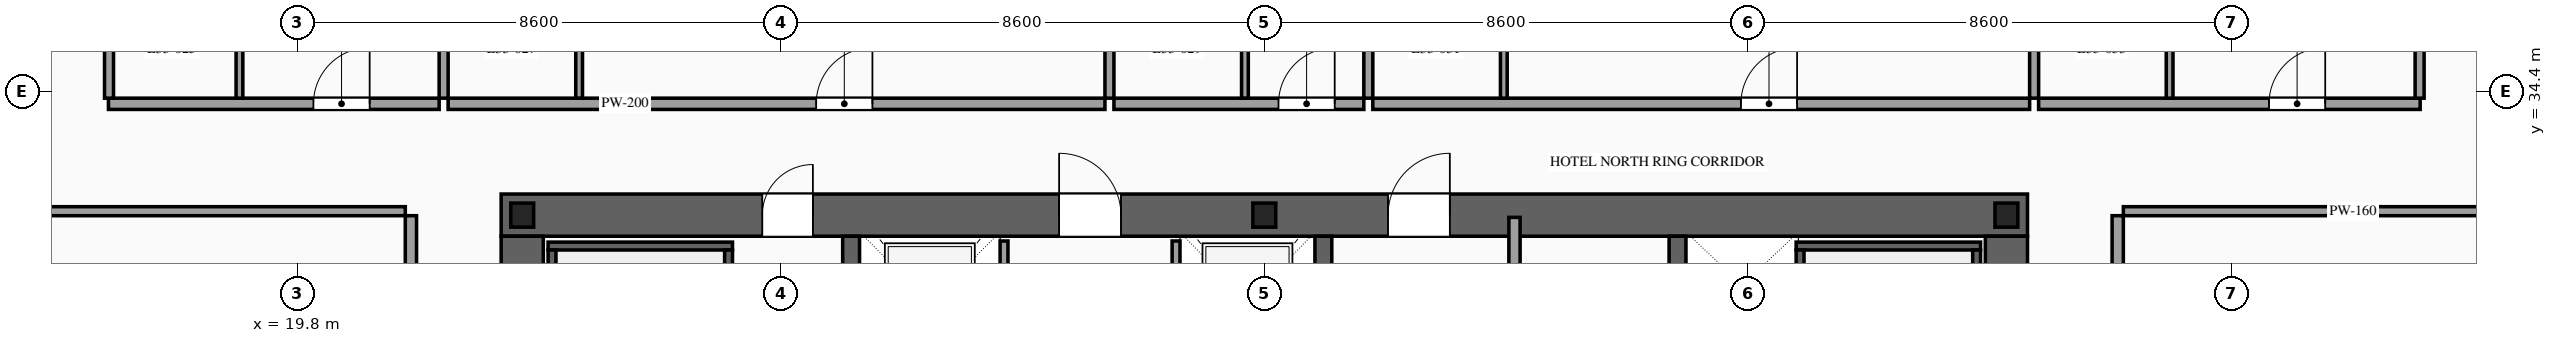
"""IFC4 building model, lengths in metres.
Left out: names, types, materials, properties, quantities, classifications, styles, units other than length and angle.
Written with IfcOpenShell. Run it as: python <this file> out.ifc"""

import sys

from ifc_helpers import new_model, si_unit, direction, frame, frame_2d, origin, origin_2d, place, context, subcontext, project, spatial, rectangle, i_section, extrude, source, transform, mapped, element, fill, save


model = new_model("IFC4")
c1 = context("Model", 3, precision=1e-05, world=origin(), true_north=direction((0.0, 1.0)))
c2 = subcontext(c1, "Body", "Model", "MODEL_VIEW")
j1 = project(units=[si_unit("LENGTHUNIT", "METRE"), si_unit("PLANEANGLEUNIT", "RADIAN")], contexts=[c1])
p1 = place(None, origin())
s1 = spatial("IfcSite", under=j1, at=p1, CompositionType="ELEMENT")
p2 = place(p1, origin())
s2 = spatial("IfcBuilding", under=s1, at=p2, CompositionType="ELEMENT")
p3 = place(p2, frame((0.0, 0.0, 126.2)))
s3 = spatial("IfcBuildingStorey", under=s2, at=p3, CompositionType="ELEMENT", Elevation=126.2)
p4 = place(p3, frame((23.425, 32.2, 0.0), z_axis=(0.0, 0.0, 1.0), x_axis=(1.0, 0.0, 0.0)))
e1 = element("IfcWall", 1, at=p4, inside=s3, PredefinedType="SHEAR", context=c2, shape_type="SweptSolid", body=[
    extrude(rectangle(XDim=27.15, YDim=0.75, at=frame_2d((13.575, 0.0))), origin(), (0.0, 0.0, 1.0), 3.6),
])
p5 = place(p4, frame((4.645, 0.0, 0.0)))
e2 = element("IfcOpeningElement", 2, at=p5, cuts=e1, PredefinedType="OPENING", context=c2, shape_type="SweptSolid", body=[
    extrude(rectangle(XDim=0.9, YDim=2.15, at=frame_2d((0.45, 1.075))), frame((0.0, 0.39, 0.0), z_axis=(0.0, -1.0, 0.0), x_axis=(1.0, 0.0, 0.0)), (0.0, 0.0, 1.0), 0.78),
])
p6 = place(p4, frame((9.925, 0.0, 0.0)))
e3 = element("IfcOpeningElement", 3, at=p6, cuts=e1, PredefinedType="OPENING", context=c2, shape_type="SweptSolid", body=[
    extrude(rectangle(XDim=1.1, YDim=2.2, at=frame_2d((0.55, 1.1))), frame((0.0, 0.39, 0.0), z_axis=(0.0, -1.0, 0.0), x_axis=(1.0, 0.0, 0.0)), (0.0, 0.0, 1.0), 0.78),
])
p7 = place(p4, frame((15.775, 0.0, 0.0)))
e4 = element("IfcOpeningElement", 4, at=p7, cuts=e1, PredefinedType="OPENING", context=c2, shape_type="SweptSolid", body=[
    extrude(rectangle(XDim=1.1, YDim=2.2, at=frame_2d((0.55, 1.1))), frame((0.0, 0.39, 0.0), z_axis=(0.0, -1.0, 0.0), x_axis=(1.0, 0.0, 0.0)), (0.0, 0.0, 1.0), 0.78),
])
m1 = source(origin(), c2, "Body", "SweptSolid", [
    extrude(rectangle(XDim=12.05, YDim=0.75, at=frame_2d((6.025, 0.0))), origin(), (0.0, 0.0, 1.0), 3.6),
])
for number, where, z_axis, x_axis in (
    (5, (23.8, 19.775, 0.0), (0.0, 0.0, 1.0), (0.0, 1.0, 0.0)),
    (6, (50.2, 19.775, 0.0), (0.0, 0.0, 1.0), (0.0, 1.0, 0.0)),
):
    element("IfcWall", number, at=place(p3, frame(where, z_axis=z_axis, x_axis=x_axis)), inside=s3, PredefinedType="SHEAR", context=c2, shape_type="MappedRepresentation", body=[
        mapped(m1, transform((0.0, 0.0, 0.0), scale=1.0)),
    ])
m2 = source(origin(), c2, "Body", "SweptSolid", [
    extrude(rectangle(XDim=12.05, YDim=0.3, at=frame_2d((6.025, 0.0))), origin(), (0.0, 0.0, 1.0), 3.6),
])
for number, where, z_axis, x_axis in (
    (7, (29.65, 19.775, 0.0), (0.0, 0.0, 1.0), (0.0, 1.0, 0.0)),
    (8, (38.05, 19.775, 0.0), (0.0, 0.0, 1.0), (0.0, 1.0, 0.0)),
    (9, (44.35, 19.775, 0.0), (0.0, 0.0, 1.0), (0.0, 1.0, 0.0)),
):
    element("IfcWall", number, at=place(p3, frame(where, z_axis=z_axis, x_axis=x_axis)), inside=s3, PredefinedType="SOLIDWALL", context=c2, shape_type="MappedRepresentation", body=[
        mapped(m2, transform((0.0, 0.0, 0.0), scale=1.0)),
    ])
m3 = source(origin(), c2, "Body", "SweptSolid", [
    extrude(i_section(OverallWidth=0.407, OverallDepth=0.428, WebThickness=0.02, FlangeThickness=0.035, at=origin_2d()), origin(), (0.0, 0.0, 1.0), 3.6),
])
for number, where, z_axis, x_axis in (
    (10, (23.8, 32.2, 0.0), (0.0, 0.0, 1.0), (1.0, 0.0, 0.0)),
    (11, (37.0, 32.2, 0.0), (0.0, 0.0, 1.0), (1.0, 0.0, 0.0)),
    (12, (50.2, 32.2, 0.0), (0.0, 0.0, 1.0), (1.0, 0.0, 0.0)),
):
    element("IfcColumn", number, at=place(p3, frame(where, z_axis=z_axis, x_axis=x_axis)), inside=s3, PredefinedType="COLUMN", context=c2, shape_type="MappedRepresentation", body=[
        mapped(m3, transform((0.0, 0.0, 0.0), scale=1.0)),
    ])
p8 = place(p3, frame((32.37, 29.4, 0.0), z_axis=(0.0, 0.0, 1.0), x_axis=(0.0, 1.0, 0.0)))
e13 = element("IfcWall", 13, at=p8, inside=s3, PredefinedType="SOLIDWALL", context=c2, shape_type="SweptSolid", body=[
    extrude(rectangle(XDim=2.34, YDim=0.14, at=frame_2d((1.17, 0.0))), origin(), (0.0, 0.0, 1.0), 3.32),
])
p9 = place(p8, frame((0.62, 0.0, 0.0)))
e14 = element("IfcOpeningElement", 14, at=p9, cuts=e13, PredefinedType="OPENING", context=c2, shape_type="SweptSolid", body=[
    extrude(rectangle(XDim=1.1, YDim=2.2, at=frame_2d((0.55, 1.1))), frame((0.0, 0.085, 0.0), z_axis=(0.0, -1.0, 0.0), x_axis=(1.0, 0.0, 0.0)), (0.0, 0.0, 1.0), 0.17),
])
p10 = place(p3, frame((35.43, 29.4, 0.0), z_axis=(0.0, 0.0, 1.0), x_axis=(0.0, 1.0, 0.0)))
e15 = element("IfcWall", 15, at=p10, inside=s3, PredefinedType="SOLIDWALL", context=c2, shape_type="SweptSolid", body=[
    extrude(rectangle(XDim=2.34, YDim=0.14, at=frame_2d((1.17, 0.0))), origin(), (0.0, 0.0, 1.0), 3.32),
])
p11 = place(p10, frame((0.62, 0.0, 0.0)))
e16 = element("IfcOpeningElement", 16, at=p11, cuts=e15, PredefinedType="OPENING", context=c2, shape_type="SweptSolid", body=[
    extrude(rectangle(XDim=1.1, YDim=2.2, at=frame_2d((0.55, 1.1))), frame((0.0, 0.085, 0.0), z_axis=(0.0, -1.0, 0.0), x_axis=(1.0, 0.0, 0.0)), (0.0, 0.0, 1.0), 0.17),
])
m4 = source(origin(), c2, "Body", "SweptSolid", [
    extrude(rectangle(XDim=3.28, YDim=0.14, at=frame_2d((1.64, 0.0))), origin(), (0.0, 0.0, 1.0), 3.32),
])
p12 = place(p3, frame((24.26, 31.65, 0.0), z_axis=(0.0, 0.0, 1.0), x_axis=(1.0, 0.0, 0.0)))
e17 = element("IfcWall", 17, at=p12, inside=s3, PredefinedType="SOLIDWALL", context=c2, shape_type="MappedRepresentation", body=[
    mapped(m4, transform((0.0, 0.0, 0.0), scale=1.0)),
])
m5 = source(origin(), c2, "Body", "SweptSolid", [
    extrude(rectangle(XDim=8.94, YDim=0.14, at=frame_2d((4.47, 0.0))), origin(), (0.0, 0.0, 1.0), 3.32),
])
for number, where, z_axis, x_axis in (
    (18, (24.33, 22.64, 0.0), (0.0, 0.0, 1.0), (0.0, 1.0, 0.0)),
    (19, (27.47, 22.64, 0.0), (0.0, 0.0, 1.0), (0.0, 1.0, 0.0)),
):
    element("IfcWall", number, at=place(p3, frame(where, z_axis=z_axis, x_axis=x_axis)), inside=s3, PredefinedType="SOLIDWALL", context=c2, shape_type="MappedRepresentation", body=[
        mapped(m5, transform((0.0, 0.0, 0.0), scale=1.0)),
    ])
p13 = place(p3, frame((46.46, 31.65, 0.0), z_axis=(0.0, 0.0, 1.0), x_axis=(1.0, 0.0, 0.0)))
e20 = element("IfcWall", 20, at=p13, inside=s3, PredefinedType="SOLIDWALL", context=c2, shape_type="MappedRepresentation", body=[
    mapped(m4, transform((0.0, 0.0, 0.0), scale=1.0)),
])
for number, where, z_axis, x_axis in (
    (21, (46.53, 22.64, 0.0), (0.0, 0.0, 1.0), (0.0, 1.0, 0.0)),
    (22, (49.67, 22.64, 0.0), (0.0, 0.0, 1.0), (0.0, 1.0, 0.0)),
):
    element("IfcWall", number, at=place(p3, frame(where, z_axis=z_axis, x_axis=x_axis)), inside=s3, PredefinedType="SOLIDWALL", context=c2, shape_type="MappedRepresentation", body=[
        mapped(m5, transform((0.0, 0.0, 0.0), scale=1.0)),
    ])
m6 = source(origin(), c2, "Body", "SweptSolid", [
    extrude(rectangle(XDim=12.72, YDim=0.2, at=frame_2d((6.36, 0.0))), origin(), (0.0, 0.0, 1.0), 3.32),
])
p14 = place(p3, frame((41.45, 19.44, 0.0), z_axis=(0.0, 0.0, 1.0), x_axis=(0.0, 1.0, 0.0)))
e23 = element("IfcWall", 23, at=p14, inside=s3, PredefinedType="PARTITIONING", context=c2, shape_type="MappedRepresentation", body=[
    mapped(m6, transform((0.0, 0.0, 0.0), scale=1.0)),
])
p15 = place(p3, frame((16.44, 34.18, 0.0), z_axis=(0.0, 0.0, 1.0), x_axis=(1.0, 0.0, 0.0)))
e24 = element("IfcWall", 24, at=p15, inside=s3, PredefinedType="PARTITIONING", context=c2, shape_type="SweptSolid", body=[
    extrude(rectangle(XDim=5.882, YDim=0.2, at=frame_2d((2.941, 0.0))), origin(), (0.0, 0.0, 1.0), 3.32),
])
p16 = place(p15, frame((3.646, 0.0, 0.0)))
e25 = element("IfcOpeningElement", 25, at=p16, cuts=e24, PredefinedType="OPENING", context=c2, shape_type="SweptSolid", body=[
    extrude(rectangle(XDim=1.0, YDim=2.2, at=frame_2d((0.5, 1.1))), frame((0.0, 0.115, 0.0), z_axis=(0.0, -1.0, 0.0), x_axis=(1.0, 0.0, 0.0)), (0.0, 0.0, 1.0), 0.23),
])
m7 = source(origin(), c2, "Body", "SweptSolid", [
    extrude(rectangle(XDim=14.97, YDim=0.16, at=frame_2d((7.485, 0.0))), origin(), (0.0, 0.0, 1.0), 3.32),
])
p17 = place(p3, frame((22.402, 34.28, 0.0), z_axis=(0.0, 0.0, 1.0), x_axis=(0.0, 1.0, 0.0)))
e26 = element("IfcWall", 26, at=p17, inside=s3, PredefinedType="PARTITIONING", context=c2, shape_type="MappedRepresentation", body=[
    mapped(m7, transform((0.0, 0.0, 0.0), scale=1.0)),
])
m8 = source(origin(), c2, "Body", "SweptSolid", [
    extrude(rectangle(XDim=2.42, YDim=0.12, at=frame_2d((1.21, 0.0))), origin(), (0.0, 0.0, 1.0), 3.32),
])
p18 = place(p3, frame((18.77, 34.28, 0.0), z_axis=(0.0, 0.0, 1.0), x_axis=(0.0, 1.0, 0.0)))
e27 = element("IfcWall", 27, at=p18, inside=s3, PredefinedType="PARTITIONING", context=c2, shape_type="MappedRepresentation", body=[
    mapped(m8, transform((0.0, 0.0, 0.0), scale=1.0)),
])
p19 = place(p3, frame((22.482, 34.18, 0.0), z_axis=(0.0, 0.0, 1.0), x_axis=(1.0, 0.0, 0.0)))
e28 = element("IfcWall", 28, at=p19, inside=s3, PredefinedType="PARTITIONING", context=c2, shape_type="SweptSolid", body=[
    extrude(rectangle(XDim=11.683, YDim=0.2, at=frame_2d((5.842, 0.0))), origin(), (0.0, 0.0, 1.0), 3.32),
])
p20 = place(p19, frame((6.547, 0.0, 0.0)))
e29 = element("IfcOpeningElement", 29, at=p20, cuts=e28, PredefinedType="OPENING", context=c2, shape_type="SweptSolid", body=[
    extrude(rectangle(XDim=1.0, YDim=2.2, at=frame_2d((0.5, 1.1))), frame((0.0, 0.115, 0.0), z_axis=(0.0, -1.0, 0.0), x_axis=(1.0, 0.0, 0.0)), (0.0, 0.0, 1.0), 0.23),
])
p21 = place(p3, frame((34.245, 34.28, 0.0), z_axis=(0.0, 0.0, 1.0), x_axis=(0.0, 1.0, 0.0)))
e30 = element("IfcWall", 30, at=p21, inside=s3, PredefinedType="PARTITIONING", context=c2, shape_type="MappedRepresentation", body=[
    mapped(m7, transform((0.0, 0.0, 0.0), scale=1.0)),
])
p22 = place(p3, frame((24.812, 34.28, 0.0), z_axis=(0.0, 0.0, 1.0), x_axis=(0.0, 1.0, 0.0)))
e31 = element("IfcWall", 31, at=p22, inside=s3, PredefinedType="PARTITIONING", context=c2, shape_type="MappedRepresentation", body=[
    mapped(m8, transform((0.0, 0.0, 0.0), scale=1.0)),
])
p23 = place(p3, frame((34.325, 34.18, 0.0), z_axis=(0.0, 0.0, 1.0), x_axis=(1.0, 0.0, 0.0)))
e32 = element("IfcWall", 32, at=p23, inside=s3, PredefinedType="PARTITIONING", context=c2, shape_type="SweptSolid", body=[
    extrude(rectangle(XDim=4.445, YDim=0.2, at=frame_2d((2.223, 0.0))), origin(), (0.0, 0.0, 1.0), 3.32),
])
p24 = place(p23, frame((2.927, 0.0, 0.0)))
e33 = element("IfcOpeningElement", 33, at=p24, cuts=e32, PredefinedType="OPENING", context=c2, shape_type="SweptSolid", body=[
    extrude(rectangle(XDim=1.0, YDim=2.2, at=frame_2d((0.5, 1.1))), frame((0.0, 0.115, 0.0), z_axis=(0.0, -1.0, 0.0), x_axis=(1.0, 0.0, 0.0)), (0.0, 0.0, 1.0), 0.23),
])
p25 = place(p3, frame((38.85, 34.28, 0.0), z_axis=(0.0, 0.0, 1.0), x_axis=(0.0, 1.0, 0.0)))
e34 = element("IfcWall", 34, at=p25, inside=s3, PredefinedType="PARTITIONING", context=c2, shape_type="MappedRepresentation", body=[
    mapped(m7, transform((0.0, 0.0, 0.0), scale=1.0)),
])
p26 = place(p3, frame((36.655, 34.28, 0.0), z_axis=(0.0, 0.0, 1.0), x_axis=(0.0, 1.0, 0.0)))
e35 = element("IfcWall", 35, at=p26, inside=s3, PredefinedType="PARTITIONING", context=c2, shape_type="MappedRepresentation", body=[
    mapped(m8, transform((0.0, 0.0, 0.0), scale=1.0)),
])
p27 = place(p3, frame((38.93, 34.18, 0.0), z_axis=(0.0, 0.0, 1.0), x_axis=(1.0, 0.0, 0.0)))
e36 = element("IfcWall", 36, at=p27, inside=s3, PredefinedType="PARTITIONING", context=c2, shape_type="SweptSolid", body=[
    extrude(rectangle(XDim=11.683, YDim=0.2, at=frame_2d((5.842, 0.0))), origin(), (0.0, 0.0, 1.0), 3.32),
])
p28 = place(p27, frame((6.547, 0.0, 0.0)))
e37 = element("IfcOpeningElement", 37, at=p28, cuts=e36, PredefinedType="OPENING", context=c2, shape_type="SweptSolid", body=[
    extrude(rectangle(XDim=1.0, YDim=2.2, at=frame_2d((0.5, 1.1))), frame((0.0, 0.115, 0.0), z_axis=(0.0, -1.0, 0.0), x_axis=(1.0, 0.0, 0.0)), (0.0, 0.0, 1.0), 0.23),
])
p29 = place(p3, frame((50.693, 34.28, 0.0), z_axis=(0.0, 0.0, 1.0), x_axis=(0.0, 1.0, 0.0)))
e38 = element("IfcWall", 38, at=p29, inside=s3, PredefinedType="PARTITIONING", context=c2, shape_type="MappedRepresentation", body=[
    mapped(m7, transform((0.0, 0.0, 0.0), scale=1.0)),
])
p30 = place(p3, frame((41.26, 34.28, 0.0), z_axis=(0.0, 0.0, 1.0), x_axis=(0.0, 1.0, 0.0)))
e39 = element("IfcWall", 39, at=p30, inside=s3, PredefinedType="PARTITIONING", context=c2, shape_type="MappedRepresentation", body=[
    mapped(m8, transform((0.0, 0.0, 0.0), scale=1.0)),
])
p31 = place(p3, frame((50.773, 34.18, 0.0), z_axis=(0.0, 0.0, 1.0), x_axis=(1.0, 0.0, 0.0)))
e40 = element("IfcWall", 40, at=p31, inside=s3, PredefinedType="PARTITIONING", context=c2, shape_type="SweptSolid", body=[
    extrude(rectangle(XDim=6.787, YDim=0.2, at=frame_2d((3.394, 0.0))), origin(), (0.0, 0.0, 1.0), 3.32),
])
p32 = place(p31, frame((4.098, 0.0, 0.0)))
e41 = element("IfcOpeningElement", 41, at=p32, cuts=e40, PredefinedType="OPENING", context=c2, shape_type="SweptSolid", body=[
    extrude(rectangle(XDim=1.0, YDim=2.2, at=frame_2d((0.5, 1.1))), frame((0.0, 0.115, 0.0), z_axis=(0.0, -1.0, 0.0), x_axis=(1.0, 0.0, 0.0)), (0.0, 0.0, 1.0), 0.23),
])
m9 = source(origin(), c2, "Body", "SweptSolid", [
    extrude(rectangle(XDim=14.82, YDim=0.16, at=frame_2d((7.41, 0.0))), origin(), (0.0, 0.0, 1.0), 3.32),
])
for number, where, z_axis, x_axis in (
    (42, (16.45, 34.28, 0.0), (0.0, 0.0, 1.0), (0.0, 1.0, 0.0)),
    (43, (57.55, 34.28, 0.0), (0.0, 0.0, 1.0), (0.0, 1.0, 0.0)),
):
    element("IfcWall", number, at=place(p3, frame(where, z_axis=z_axis, x_axis=x_axis)), inside=s3, PredefinedType="PARTITIONING", context=c2, shape_type="MappedRepresentation", body=[
        mapped(m9, transform((0.0, 0.0, 0.0), scale=1.0)),
    ])
p33 = place(p3, frame((53.103, 34.28, 0.0), z_axis=(0.0, 0.0, 1.0), x_axis=(0.0, 1.0, 0.0)))
e44 = element("IfcWall", 44, at=p33, inside=s3, PredefinedType="PARTITIONING", context=c2, shape_type="MappedRepresentation", body=[
    mapped(m8, transform((0.0, 0.0, 0.0), scale=1.0)),
])
p34 = place(p3, frame((21.82, 19.41, 0.0), z_axis=(0.0, 0.0, 1.0), x_axis=(0.0, 1.0, 0.0)))
e45 = element("IfcWall", 45, at=p34, inside=s3, PredefinedType="PARTITIONING", context=c2, shape_type="SweptSolid", body=[
    extrude(rectangle(XDim=12.78, YDim=0.2, at=frame_2d((6.39, 0.0))), origin(), (0.0, 0.0, 1.0), 3.32),
])
p35 = place(p34, frame((5.89, 0.0, 0.0)))
e46 = element("IfcOpeningElement", 46, at=p35, cuts=e45, PredefinedType="OPENING", context=c2, shape_type="SweptSolid", body=[
    extrude(rectangle(XDim=1.0, YDim=2.2, at=frame_2d((0.5, 1.1))), frame((0.0, 0.115, 0.0), z_axis=(0.0, -1.0, 0.0), x_axis=(1.0, 0.0, 0.0)), (0.0, 0.0, 1.0), 0.23),
])
m10 = source(origin(), c2, "Body", "SweptSolid", [
    extrude(rectangle(XDim=8.17, YDim=0.16, at=frame_2d((4.085, 0.0))), origin(), (0.0, 0.0, 1.0), 2.815),
])
p36 = place(p3, frame((13.55, 32.27, 0.0), z_axis=(0.0, 0.0, 1.0), x_axis=(1.0, 0.0, 0.0)))
e47 = element("IfcWall", 47, at=p36, inside=s3, PredefinedType="PARTITIONING", context=c2, shape_type="MappedRepresentation", body=[
    mapped(m10, transform((0.0, 0.0, 0.0), scale=1.0)),
])
p37 = place(p3, frame((52.18, 25.88, 0.0), z_axis=(0.0, 0.0, 1.0), x_axis=(0.0, 1.0, 0.0)))
e48 = element("IfcWall", 48, at=p37, inside=s3, PredefinedType="PARTITIONING", context=c2, shape_type="SweptSolid", body=[
    extrude(rectangle(XDim=6.31, YDim=0.2, at=frame_2d((3.155, 0.0))), origin(), (0.0, 0.0, 1.0), 3.32),
])
p38 = place(p37, frame((3.835, 0.0, 0.0)))
e49 = element("IfcOpeningElement", 49, at=p38, cuts=e48, PredefinedType="OPENING", context=c2, shape_type="SweptSolid", body=[
    extrude(rectangle(XDim=1.0, YDim=2.2, at=frame_2d((0.5, 1.1))), frame((0.0, 0.115, 0.0), z_axis=(0.0, -1.0, 0.0), x_axis=(1.0, 0.0, 0.0)), (0.0, 0.0, 1.0), 0.23),
])
p39 = place(p3, frame((52.28, 32.27, 0.0), z_axis=(0.0, 0.0, 1.0), x_axis=(1.0, 0.0, 0.0)))
e50 = element("IfcWall", 50, at=p39, inside=s3, PredefinedType="PARTITIONING", context=c2, shape_type="MappedRepresentation", body=[
    mapped(m10, transform((0.0, 0.0, 0.0), scale=1.0)),
])
m11 = source(origin(), c2, "Body", "SweptSolid", [
    extrude(rectangle(XDim=0.9, YDim=2.15, at=frame_2d((0.45, 1.075))), frame((0.0, 0.025, 0.0), z_axis=(0.0, -1.0, 0.0), x_axis=(1.0, 0.0, 0.0)), (0.0, 0.0, 1.0), 0.05),
])
p40 = place(p5, origin())
e51 = element("IfcDoor", 51, at=p40, inside=s3, OperationType="SINGLE_SWING_RIGHT", PredefinedType="DOOR", context=c2, shape_type="MappedRepresentation", body=[
    mapped(m11, transform((0.0, 0.0, 0.0), scale=1.0)),
])
fill(e2, e51)
m12 = source(origin(), c2, "Body", "SweptSolid", [
    extrude(rectangle(XDim=1.1, YDim=2.2, at=frame_2d((0.55, 1.1))), frame((0.0, 0.025, 0.0), z_axis=(0.0, -1.0, 0.0), x_axis=(1.0, 0.0, 0.0)), (0.0, 0.0, 1.0), 0.05),
])
p41 = place(p6, origin())
e52 = element("IfcDoor", 52, at=p41, inside=s3, OperationType="SINGLE_SWING_LEFT", PredefinedType="DOOR", context=c2, shape_type="MappedRepresentation", body=[
    mapped(m12, transform((0.0, 0.0, 0.0), scale=1.0)),
])
fill(e3, e52)
p42 = place(p7, origin())
e53 = element("IfcDoor", 53, at=p42, inside=s3, OperationType="SINGLE_SWING_RIGHT", PredefinedType="DOOR", context=c2, shape_type="MappedRepresentation", body=[
    mapped(m12, transform((0.0, 0.0, 0.0), scale=1.0)),
])
fill(e4, e53)
m13 = source(origin(), c2, "Body", "SweptSolid", [
    extrude(rectangle(XDim=1.0, YDim=2.2, at=frame_2d((0.5, 1.1))), frame((0.0, 0.025, 0.0), z_axis=(0.0, -1.0, 0.0), x_axis=(1.0, 0.0, 0.0)), (0.0, 0.0, 1.0), 0.05),
])
p43 = place(p16, origin())
e54 = element("IfcDoor", 54, at=p43, inside=s3, OperationType="SINGLE_SWING_RIGHT", PredefinedType="DOOR", context=c2, shape_type="MappedRepresentation", body=[
    mapped(m13, transform((0.0, 0.0, 0.0), scale=1.0)),
])
fill(e25, e54)
p44 = place(p20, origin())
e55 = element("IfcDoor", 55, at=p44, inside=s3, OperationType="SINGLE_SWING_RIGHT", PredefinedType="DOOR", context=c2, shape_type="MappedRepresentation", body=[
    mapped(m13, transform((0.0, 0.0, 0.0), scale=1.0)),
])
fill(e29, e55)
p45 = place(p24, origin())
e56 = element("IfcDoor", 56, at=p45, inside=s3, OperationType="SINGLE_SWING_RIGHT", PredefinedType="DOOR", context=c2, shape_type="MappedRepresentation", body=[
    mapped(m13, transform((0.0, 0.0, 0.0), scale=1.0)),
])
fill(e33, e56)
p46 = place(p28, origin())
e57 = element("IfcDoor", 57, at=p46, inside=s3, OperationType="SINGLE_SWING_RIGHT", PredefinedType="DOOR", context=c2, shape_type="MappedRepresentation", body=[
    mapped(m13, transform((0.0, 0.0, 0.0), scale=1.0)),
])
fill(e37, e57)
p47 = place(p32, origin())
e58 = element("IfcDoor", 58, at=p47, inside=s3, OperationType="SINGLE_SWING_RIGHT", PredefinedType="DOOR", context=c2, shape_type="MappedRepresentation", body=[
    mapped(m13, transform((0.0, 0.0, 0.0), scale=1.0)),
])
fill(e41, e58)
save(model, sys.argv[1])
